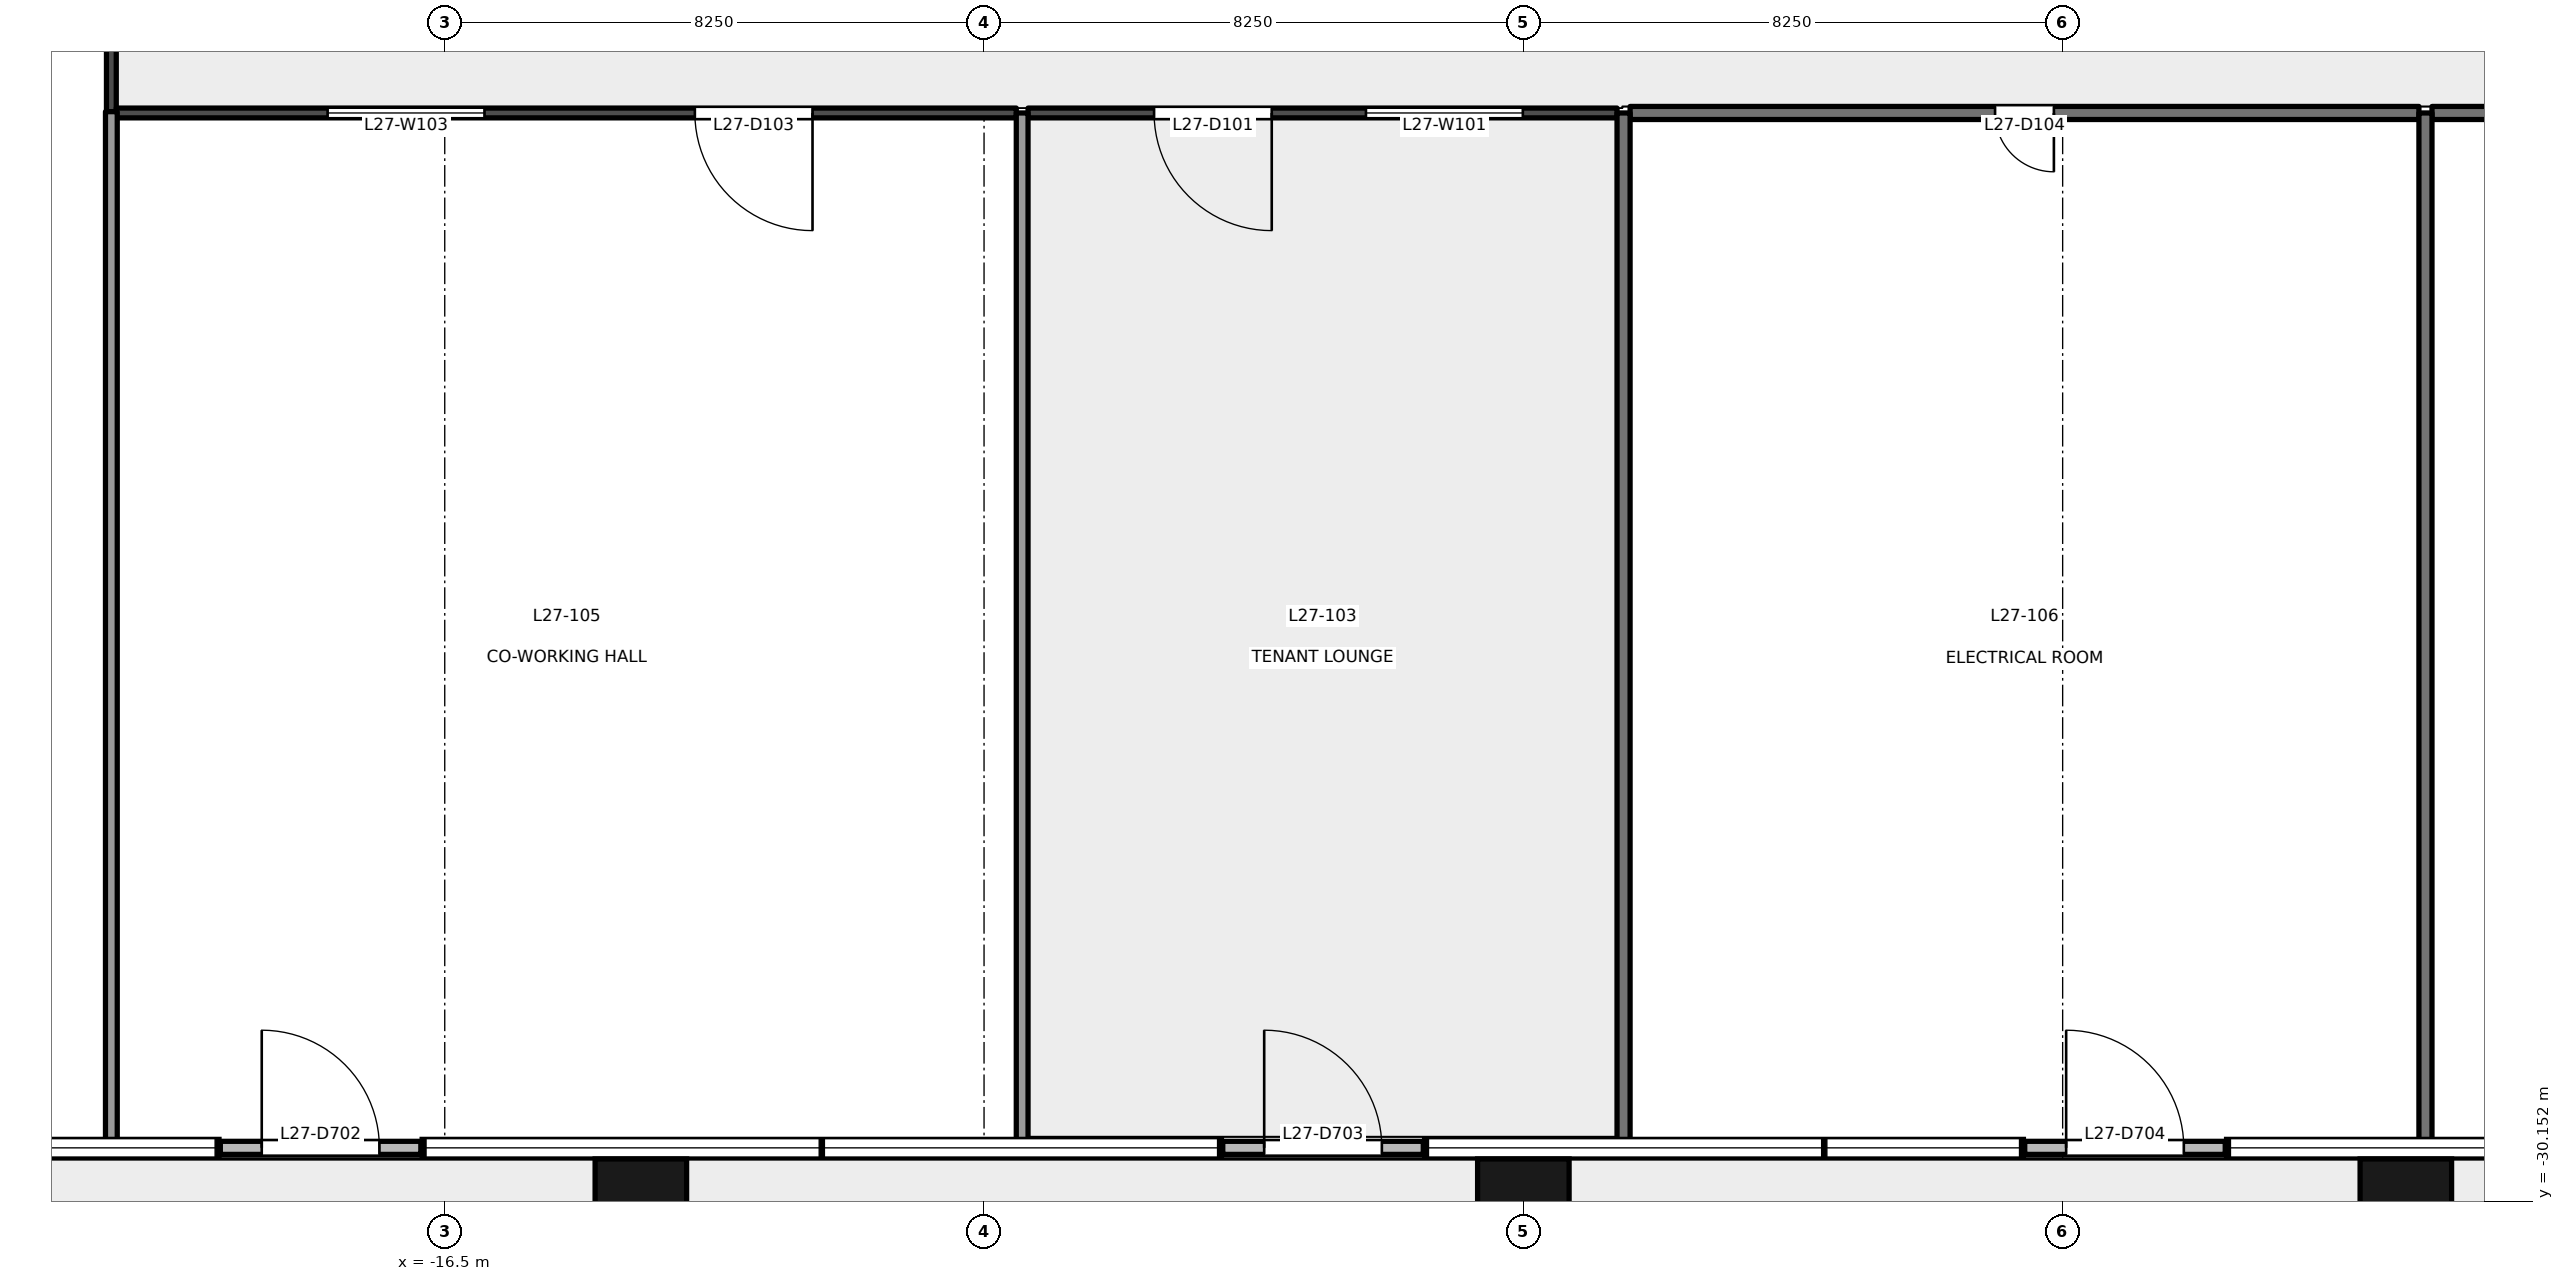
"""IFC4 building model, lengths in metres.
Left out: names, types, materials, properties, quantities, classifications, styles, units other than length and angle.
Written with IfcOpenShell. Run it as: python <this file> out.ifc"""

import sys

from ifc_helpers import new_model, si_unit, direction, frame, frame_2d, origin, origin_2d, place, context, subcontext, project, spatial, rectangle, extrude, element, fill, save


model = new_model("IFC4")
c1 = context("Model", 3, precision=1e-05, world=origin(), true_north=direction((0.0, 1.0)))
c2 = subcontext(c1, "Body", "Model", "MODEL_VIEW")
j1 = project(units=[si_unit("LENGTHUNIT", "METRE"), si_unit("PLANEANGLEUNIT", "RADIAN")], contexts=[c1])
p1 = place(None, origin())
s1 = spatial("IfcSite", under=j1, at=p1, CompositionType="ELEMENT")
p2 = place(p1, origin())
s2 = spatial("IfcBuilding", under=s1, at=p2, CompositionType="ELEMENT")
p3 = place(p2, frame((0.0, 0.0, 120.7)))
s3 = spatial("IfcBuildingStorey", under=s2, at=p3, CompositionType="ELEMENT", Elevation=120.7)
for number, where, z_axis, x_axis in (
    (1, (-13.5, -30.4, -0.2), (0.0, 0.0, 1.0), (1.0, 0.0, 0.0)),
    (2, (0.0, -30.4, -0.2), (0.0, 0.0, 1.0), (1.0, 0.0, 0.0)),
    (3, (13.5, -30.4, -0.2), (0.0, 0.0, 1.0), (1.0, 0.0, 0.0)),
):
    element("IfcColumn", number, at=place(p3, frame(where, z_axis=z_axis, x_axis=x_axis)), inside=s3, PredefinedType="COLUMN", context=c2, shape_type="SweptSolid", body=[
        extrude(rectangle(XDim=1.4, YDim=1.8, at=origin_2d()), origin(), (0.0, 0.0, 1.0), 5.4),
    ])
p4 = place(p3, frame((-19.933, -29.33, 0.0), z_axis=(0.0, 0.0, 1.0), x_axis=(1.0, 0.0, 0.0)))
e4 = element("IfcWall", 4, at=p4, inside=s3, PredefinedType="SOLIDWALL", context=c2, shape_type="SweptSolid", body=[
    extrude(rectangle(XDim=3.067, YDim=0.2, at=frame_2d((1.534, 0.0))), origin(), (0.0, 0.0, 1.0), 4.1),
])
p5 = place(p4, frame((0.634, 0.0, 0.0)))
e5 = element("IfcOpeningElement", 5, at=p5, cuts=e4, PredefinedType="OPENING", context=c2, shape_type="SweptSolid", body=[
    extrude(rectangle(XDim=1.8, YDim=2.4, at=frame_2d((0.9, 1.2))), frame((0.0, 0.111, 0.0), z_axis=(0.0, -1.0, 0.0), x_axis=(1.0, 0.0, 0.0)), (0.0, 0.0, 1.0), 0.221),
])
p6 = place(p3, frame((-4.598, -29.33, 0.0), z_axis=(0.0, 0.0, 1.0), x_axis=(1.0, 0.0, 0.0)))
e6 = element("IfcWall", 6, at=p6, inside=s3, PredefinedType="SOLIDWALL", context=c2, shape_type="SweptSolid", body=[
    extrude(rectangle(XDim=3.067, YDim=0.2, at=frame_2d((1.533, 0.0))), origin(), (0.0, 0.0, 1.0), 4.1),
])
p7 = place(p6, frame((0.634, 0.0, 0.0)))
e7 = element("IfcOpeningElement", 7, at=p7, cuts=e6, PredefinedType="OPENING", context=c2, shape_type="SweptSolid", body=[
    extrude(rectangle(XDim=1.8, YDim=2.4, at=frame_2d((0.9, 1.2))), frame((0.0, 0.111, 0.0), z_axis=(0.0, -1.0, 0.0), x_axis=(1.0, 0.0, 0.0)), (0.0, 0.0, 1.0), 0.221),
])
p8 = place(p3, frame((7.67, -29.33, 0.0), z_axis=(0.0, 0.0, 1.0), x_axis=(1.0, 0.0, 0.0)))
e8 = element("IfcWall", 8, at=p8, inside=s3, PredefinedType="SOLIDWALL", context=c2, shape_type="SweptSolid", body=[
    extrude(rectangle(XDim=3.067, YDim=0.2, at=frame_2d((1.534, 0.0))), origin(), (0.0, 0.0, 1.0), 4.1),
])
p9 = place(p8, frame((0.634, 0.0, 0.0)))
e9 = element("IfcOpeningElement", 9, at=p9, cuts=e8, PredefinedType="OPENING", context=c2, shape_type="SweptSolid", body=[
    extrude(rectangle(XDim=1.8, YDim=2.4, at=frame_2d((0.9, 1.2))), frame((0.0, 0.111, 0.0), z_axis=(0.0, -1.0, 0.0), x_axis=(1.0, 0.0, 0.0)), (0.0, 0.0, 1.0), 0.221),
])
p10 = place(p3, frame((1.433, -13.5, 0.0), z_axis=(0.0, 0.0, 1.0), x_axis=(-1.0, 0.0, 0.0)))
e10 = element("IfcWall", 10, at=p10, inside=s3, PredefinedType="PARTITIONING", context=c2, shape_type="SweptSolid", body=[
    extrude(rectangle(XDim=9.01, YDim=0.15, at=frame_2d((4.505, 0.0))), origin(), (0.0, 0.0, 1.0), 4.3),
])
p11 = place(p10, frame((5.282, 0.0, 0.0)))
e11 = element("IfcOpeningElement", 11, at=p11, cuts=e10, PredefinedType="OPENING", context=c2, shape_type="SweptSolid", body=[
    extrude(rectangle(XDim=1.8, YDim=2.1, at=frame_2d((0.9, 1.05))), frame((0.0, 0.085, 0.0), z_axis=(0.0, -1.0, 0.0), x_axis=(1.0, 0.0, 0.0)), (0.0, 0.0, 1.0), 0.171),
])
p12 = place(p10, frame((1.441, 0.0, 0.0)))
e12 = element("IfcOpeningElement", 12, at=p12, cuts=e10, PredefinedType="OPENING", context=c2, shape_type="SweptSolid", body=[
    extrude(rectangle(XDim=2.4, YDim=2.4, at=frame_2d((1.2, 1.2))), frame((0.0, 0.085, 0.0), z_axis=(0.0, -1.0, 0.0), x_axis=(1.0, 0.0, 0.0)), (0.0, 0.0, 1.0), 0.171),
])
p13 = place(p3, frame((-21.6, -13.48, 0.0), z_axis=(0.0, 0.0, 1.0), x_axis=(0.0, 1.0, 0.0)))
e13 = element("IfcWall", 13, at=p13, inside=s3, PredefinedType="PARTITIONING", context=c2, shape_type="SweptSolid", body=[
    extrude(rectangle(XDim=13.89, YDim=0.15, at=frame_2d((6.945, 0.0))), origin(), (0.0, 0.0, 1.0), 4.7),
])
p14 = place(p13, frame((6.045, 0.0, 0.0)))
e14 = element("IfcOpeningElement", 14, at=p14, cuts=e13, PredefinedType="OPENING", context=c2, shape_type="SweptSolid", body=[
    extrude(rectangle(XDim=1.8, YDim=2.1, at=frame_2d((0.9, 1.05))), frame((0.0, 0.085, 0.0), z_axis=(0.0, -1.0, 0.0), x_axis=(1.0, 0.0, 0.0)), (0.0, 0.0, 1.0), 0.171),
])
p15 = place(p13, frame((9.668, 0.0, 0.0)))
e15 = element("IfcOpeningElement", 15, at=p15, cuts=e13, PredefinedType="OPENING", context=c2, shape_type="SweptSolid", body=[
    extrude(rectangle(XDim=2.4, YDim=2.4, at=frame_2d((1.2, 1.2))), frame((0.0, 0.085, 0.0), z_axis=(0.0, -1.0, 0.0), x_axis=(1.0, 0.0, 0.0)), (0.0, 0.0, 1.0), 0.171),
])
p16 = place(p3, frame((-7.757, -13.5, 0.0), z_axis=(0.0, 0.0, 1.0), x_axis=(-1.0, 0.0, 0.0)))
e16 = element("IfcWall", 16, at=p16, inside=s3, PredefinedType="PARTITIONING", context=c2, shape_type="SweptSolid", body=[
    extrude(rectangle(XDim=13.768, YDim=0.15, at=frame_2d((6.884, 0.0))), origin(), (0.0, 0.0, 1.0), 4.3),
])
p17 = place(p16, frame((3.117, 0.0, 0.0)))
e17 = element("IfcOpeningElement", 17, at=p17, cuts=e16, PredefinedType="OPENING", context=c2, shape_type="SweptSolid", body=[
    extrude(rectangle(XDim=1.8, YDim=2.1, at=frame_2d((0.9, 1.05))), frame((0.0, 0.085, 0.0), z_axis=(0.0, -1.0, 0.0), x_axis=(1.0, 0.0, 0.0)), (0.0, 0.0, 1.0), 0.171),
])
p18 = place(p16, frame((8.135, 0.0, 0.0)))
e18 = element("IfcOpeningElement", 18, at=p18, cuts=e16, PredefinedType="OPENING", context=c2, shape_type="SweptSolid", body=[
    extrude(rectangle(XDim=2.4, YDim=2.4, at=frame_2d((1.2, 1.2))), frame((0.0, 0.085, 0.0), z_axis=(0.0, -1.0, 0.0), x_axis=(1.0, 0.0, 0.0)), (0.0, 0.0, 1.0), 0.171),
])
p19 = place(p3, frame((13.7, -13.5, 0.0), z_axis=(0.0, 0.0, 1.0), x_axis=(-1.0, 0.0, 0.0)))
e19 = element("IfcWall", 19, at=p19, inside=s3, PredefinedType="PARTITIONING", context=c2, shape_type="SweptSolid", body=[
    extrude(rectangle(XDim=12.067, YDim=0.2, at=frame_2d((6.033, 0.0))), origin(), (0.0, 0.0, 1.0), 4.3),
])
p20 = place(p19, frame((5.584, 0.0, 0.0)))
e20 = element("IfcOpeningElement", 20, at=p20, cuts=e19, PredefinedType="OPENING", context=c2, shape_type="SweptSolid", body=[
    extrude(rectangle(XDim=0.9, YDim=2.1, at=frame_2d((0.45, 1.05))), frame((0.0, 0.111, 0.0), z_axis=(0.0, -1.0, 0.0), x_axis=(1.0, 0.0, 0.0)), (0.0, 0.0, 1.0), 0.221),
])
p21 = place(p3, frame((21.5, -13.5, 0.0), z_axis=(0.0, 0.0, 1.0), x_axis=(-1.0, 0.0, 0.0)))
e21 = element("IfcWall", 21, at=p21, inside=s3, PredefinedType="PARTITIONING", context=c2, shape_type="SweptSolid", body=[
    extrude(rectangle(XDim=7.6, YDim=0.2, at=frame_2d((3.8, 0.0))), origin(), (0.0, 0.0, 1.0), 5.2),
])
p22 = place(p21, frame((3.35, 0.0, 0.0)))
e22 = element("IfcOpeningElement", 22, at=p22, cuts=e21, PredefinedType="OPENING", context=c2, shape_type="SweptSolid", body=[
    extrude(rectangle(XDim=0.9, YDim=2.1, at=frame_2d((0.45, 1.05))), frame((0.0, 0.111, 0.0), z_axis=(0.0, -1.0, 0.0), x_axis=(1.0, 0.0, 0.0)), (0.0, 0.0, 1.0), 0.221),
])
p23 = place(p3, frame((-7.667, -29.24, 0.0), z_axis=(0.0, 0.0, 1.0), x_axis=(0.0, 1.0, 0.0)))
e23 = element("IfcWall", 23, at=p23, inside=s3, PredefinedType="PARTITIONING", context=c2, shape_type="SweptSolid", body=[
    extrude(rectangle(XDim=15.74, YDim=0.18, at=frame_2d((7.87, 0.0))), origin(), (0.0, 0.0, 1.0), 5.2),
])
p24 = place(p3, frame((1.533, -13.5, 0.0), z_axis=(0.0, 0.0, 1.0), x_axis=(0.0, -1.0, 0.0)))
e24 = element("IfcWall", 24, at=p24, inside=s3, PredefinedType="PARTITIONING", context=c2, shape_type="SweptSolid", body=[
    extrude(rectangle(XDim=15.74, YDim=0.2, at=frame_2d((7.87, 0.0))), origin(), (0.0, 0.0, 1.0), 5.2),
])
p25 = place(p3, frame((-21.6, -13.48, 0.0), z_axis=(0.0, 0.0, 1.0), x_axis=(0.0, -1.0, 0.0)))
e25 = element("IfcWall", 25, at=p25, inside=s3, PredefinedType="PARTITIONING", context=c2, shape_type="SweptSolid", body=[
    extrude(rectangle(XDim=15.76, YDim=0.18, at=frame_2d((7.88, 0.0))), origin(), (0.0, 0.0, 1.0), 5.2),
])
p26 = place(p3, frame((13.8, -13.5, 0.0), z_axis=(0.0, 0.0, 1.0), x_axis=(0.0, -1.0, 0.0)))
e26 = element("IfcWall", 26, at=p26, inside=s3, PredefinedType="PARTITIONING", context=c2, shape_type="SweptSolid", body=[
    extrude(rectangle(XDim=15.74, YDim=0.2, at=frame_2d((7.87, 0.0))), origin(), (0.0, 0.0, 1.0), 5.2),
])
p27 = place(p5, origin())
e27 = element("IfcDoor", 27, at=p27, inside=s3, OperationType="DOUBLE_DOOR_SINGLE_SWING", PredefinedType="DOOR", context=c2, shape_type="SweptSolid", body=[
    extrude(rectangle(XDim=1.8, YDim=2.4, at=frame_2d((0.9, 1.2))), frame((0.0, 0.025, 0.0), z_axis=(0.0, -1.0, 0.0), x_axis=(1.0, 0.0, 0.0)), (0.0, 0.0, 1.0), 0.05),
])
fill(e5, e27)
p28 = place(p7, origin())
e28 = element("IfcDoor", 28, at=p28, inside=s3, OperationType="DOUBLE_DOOR_SINGLE_SWING", PredefinedType="DOOR", context=c2, shape_type="SweptSolid", body=[
    extrude(rectangle(XDim=1.8, YDim=2.4, at=frame_2d((0.9, 1.2))), frame((0.0, 0.025, 0.0), z_axis=(0.0, -1.0, 0.0), x_axis=(1.0, 0.0, 0.0)), (0.0, 0.0, 1.0), 0.05),
])
fill(e7, e28)
p29 = place(p9, origin())
e29 = element("IfcDoor", 29, at=p29, inside=s3, OperationType="DOUBLE_DOOR_SINGLE_SWING", PredefinedType="DOOR", context=c2, shape_type="SweptSolid", body=[
    extrude(rectangle(XDim=1.8, YDim=2.4, at=frame_2d((0.9, 1.2))), frame((0.0, 0.025, 0.0), z_axis=(0.0, -1.0, 0.0), x_axis=(1.0, 0.0, 0.0)), (0.0, 0.0, 1.0), 0.05),
])
fill(e9, e29)
p30 = place(p11, origin())
e30 = element("IfcDoor", 30, at=p30, inside=s3, OperationType="DOUBLE_DOOR_SINGLE_SWING", PredefinedType="DOOR", context=c2, shape_type="SweptSolid", body=[
    extrude(rectangle(XDim=1.8, YDim=2.1, at=frame_2d((0.9, 1.05))), frame((0.0, 0.025, 0.0), z_axis=(0.0, -1.0, 0.0), x_axis=(1.0, 0.0, 0.0)), (0.0, 0.0, 1.0), 0.05),
])
fill(e11, e30)
p31 = place(p17, origin())
e31 = element("IfcDoor", 31, at=p31, inside=s3, OperationType="DOUBLE_DOOR_SINGLE_SWING", PredefinedType="DOOR", context=c2, shape_type="SweptSolid", body=[
    extrude(rectangle(XDim=1.8, YDim=2.1, at=frame_2d((0.9, 1.05))), frame((0.0, 0.025, 0.0), z_axis=(0.0, -1.0, 0.0), x_axis=(1.0, 0.0, 0.0)), (0.0, 0.0, 1.0), 0.05),
])
fill(e17, e31)
p32 = place(p20, origin())
e32 = element("IfcDoor", 32, at=p32, inside=s3, OperationType="SINGLE_SWING_LEFT", PredefinedType="DOOR", context=c2, shape_type="SweptSolid", body=[
    extrude(rectangle(XDim=0.9, YDim=2.1, at=frame_2d((0.45, 1.05))), frame((0.0, 0.025, 0.0), z_axis=(0.0, -1.0, 0.0), x_axis=(1.0, 0.0, 0.0)), (0.0, 0.0, 1.0), 0.05),
])
fill(e20, e32)
p33 = place(p12, origin())
e33 = element("IfcWindow", 33, at=p33, inside=s3, PartitioningType="SINGLE_PANEL", PredefinedType="WINDOW", context=c2, shape_type="SweptSolid", body=[
    extrude(rectangle(XDim=2.4, YDim=2.4, at=frame_2d((1.2, 1.2))), frame((0.0, 0.03, 0.0), z_axis=(0.0, -1.0, 0.0), x_axis=(1.0, 0.0, 0.0)), (0.0, 0.0, 1.0), 0.06),
])
fill(e12, e33)
p34 = place(p18, origin())
e34 = element("IfcWindow", 34, at=p34, inside=s3, PartitioningType="SINGLE_PANEL", PredefinedType="WINDOW", context=c2, shape_type="SweptSolid", body=[
    extrude(rectangle(XDim=2.4, YDim=2.4, at=frame_2d((1.2, 1.2))), frame((0.0, 0.03, 0.0), z_axis=(0.0, -1.0, 0.0), x_axis=(1.0, 0.0, 0.0)), (0.0, 0.0, 1.0), 0.06),
])
fill(e18, e34)
save(model, sys.argv[1])
